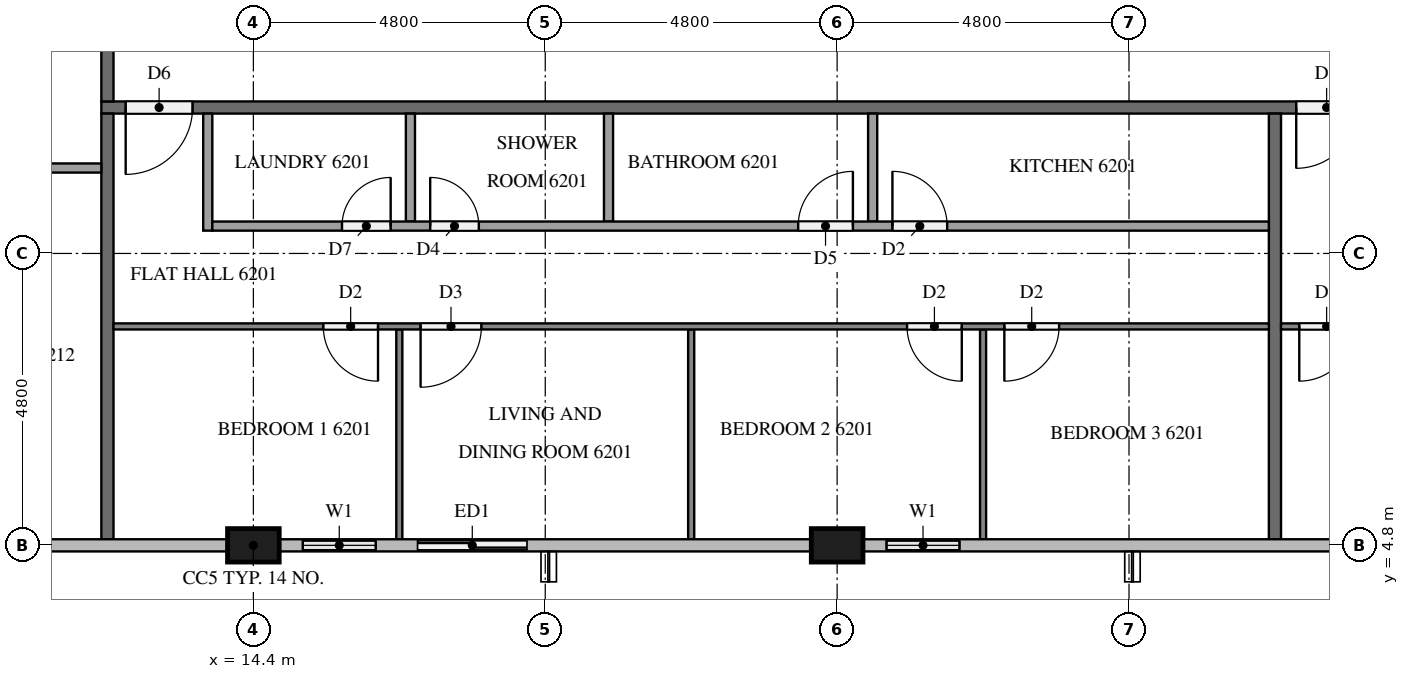
"""IFC4 building model, lengths in metres.
Left out: names, types, materials, properties, quantities, classifications, styles, units other than length and angle.
Written with IfcOpenShell. Run it as: python <this file> out.ifc"""

import sys

from ifc_helpers import new_model, si_unit, direction, frame, frame_2d, origin, origin_2d, place, context, subcontext, project, spatial, rectangle, extrude, element, fill, save


model = new_model("IFC4")
c1 = context("Model", 3, precision=1e-05, world=origin(), true_north=direction((0.0, 1.0)))
c2 = subcontext(c1, "Body", "Model", "MODEL_VIEW")
j1 = project(units=[si_unit("LENGTHUNIT", "METRE"), si_unit("PLANEANGLEUNIT", "RADIAN")], contexts=[c1])
p1 = place(None, origin())
s1 = spatial("IfcSite", under=j1, at=p1, CompositionType="ELEMENT")
p2 = place(p1, origin())
s2 = spatial("IfcBuilding", under=s1, at=p2, CompositionType="ELEMENT")
p3 = place(p2, frame((0.0, 0.0, 238.7)))
s3 = spatial("IfcBuildingStorey", under=s2, at=p3, CompositionType="ELEMENT", Elevation=238.7)
for number, where, z_axis, x_axis in (
    (1, (14.4, 4.8, 0.0), (0.0, 0.0, 1.0), (1.0, 0.0, 0.0)),
    (2, (24.0, 4.8, 0.0), (0.0, 0.0, 1.0), (1.0, 0.0, 0.0)),
):
    element("IfcColumn", number, at=place(p3, frame(where, z_axis=z_axis, x_axis=x_axis)), inside=s3, PredefinedType="COLUMN", context=c2, shape_type="SweptSolid", body=[
        extrude(rectangle(XDim=0.85, YDim=0.55, at=origin_2d()), origin(), (0.0, 0.0, 1.0), 3.2),
    ])
p4 = place(p3, frame((14.825, 4.8, 0.0), z_axis=(0.0, 0.0, 1.0), x_axis=(1.0, 0.0, 0.0)))
e3 = element("IfcWall", 3, at=p4, inside=s3, PredefinedType="SOLIDWALL", context=c2, shape_type="SweptSolid", body=[
    extrude(rectangle(XDim=4.375, YDim=0.15, at=frame_2d((2.188, 0.0))), origin(), (0.0, 0.0, 1.0), 3.2),
])
p5 = place(p4, frame((0.387, 0.0, 0.9)))
e4 = element("IfcOpeningElement", 4, at=p5, cuts=e3, PredefinedType="OPENING", context=c2, shape_type="SweptSolid", body=[
    extrude(rectangle(XDim=1.2, YDim=1.4, at=frame_2d((0.6, 0.7))), frame((0.0, 0.085, 0.0), z_axis=(0.0, -1.0, 0.0), x_axis=(1.0, 0.0, 0.0)), (0.0, 0.0, 1.0), 0.17),
])
p6 = place(p4, frame((2.275, 0.0, 0.0)))
e5 = element("IfcOpeningElement", 5, at=p6, cuts=e3, PredefinedType="OPENING", context=c2, shape_type="SweptSolid", body=[
    extrude(rectangle(XDim=1.8, YDim=2.4, at=frame_2d((0.9, 1.2))), frame((0.0, 0.085, 0.0), z_axis=(0.0, -1.0, 0.0), x_axis=(1.0, 0.0, 0.0)), (0.0, 0.0, 1.0), 0.17),
])
p7 = place(p3, frame((24.425, 4.8, 0.0), z_axis=(0.0, 0.0, 1.0), x_axis=(1.0, 0.0, 0.0)))
e6 = element("IfcWall", 6, at=p7, inside=s3, PredefinedType="SOLIDWALL", context=c2, shape_type="SweptSolid", body=[
    extrude(rectangle(XDim=1.975, YDim=0.15, at=frame_2d((0.987, 0.0))), origin(), (0.0, 0.0, 1.0), 3.2),
])
p8 = place(p7, frame((0.387, 0.0, 0.9)))
e7 = element("IfcOpeningElement", 7, at=p8, cuts=e6, PredefinedType="OPENING", context=c2, shape_type="SweptSolid", body=[
    extrude(rectangle(XDim=1.2, YDim=1.4, at=frame_2d((0.6, 0.7))), frame((0.0, 0.085, 0.0), z_axis=(0.0, -1.0, 0.0), x_axis=(1.0, 0.0, 0.0)), (0.0, 0.0, 1.0), 0.17),
])
p9 = place(p3, frame((50.5, 12.0, 0.0), z_axis=(0.0, 0.0, 1.0), x_axis=(-1.0, 0.0, 0.0)))
e8 = element("IfcWall", 8, at=p9, inside=s3, PredefinedType="PARTITIONING", context=c2, shape_type="SweptSolid", body=[
    extrude(rectangle(XDim=38.6, YDim=0.2, at=frame_2d((19.3, 0.0))), origin(), (0.0, 0.0, 1.0), 3.2),
])
p10 = place(p9, frame((37.1, 0.0, 0.0)))
e9 = element("IfcOpeningElement", 9, at=p10, cuts=e8, PredefinedType="OPENING", context=c2, shape_type="SweptSolid", body=[
    extrude(rectangle(XDim=1.1, YDim=2.1, at=frame_2d((0.55, 1.05))), frame((0.0, 0.11, 0.0), z_axis=(0.0, -1.0, 0.0), x_axis=(1.0, 0.0, 0.0)), (0.0, 0.0, 1.0), 0.22),
])
p11 = place(p9, frame((17.95, 0.0, 0.0)))
e10 = element("IfcOpeningElement", 10, at=p11, cuts=e8, PredefinedType="OPENING", context=c2, shape_type="SweptSolid", body=[
    extrude(rectangle(XDim=1.0, YDim=2.1, at=frame_2d((0.5, 1.05))), frame((0.0, 0.11, 0.0), z_axis=(0.0, -1.0, 0.0), x_axis=(1.0, 0.0, 0.0)), (0.0, 0.0, 1.0), 0.22),
])
p12 = place(p9, frame((8.35, 0.0, 0.0)))
e11 = element("IfcOpeningElement", 11, at=p12, cuts=e8, PredefinedType="OPENING", context=c2, shape_type="SweptSolid", body=[
    extrude(rectangle(XDim=1.0, YDim=2.1, at=frame_2d((0.5, 1.05))), frame((0.0, 0.11, 0.0), z_axis=(0.0, -1.0, 0.0), x_axis=(1.0, 0.0, 0.0)), (0.0, 0.0, 1.0), 0.22),
])
p13 = place(p3, frame((12.0, 12.1, 0.0), z_axis=(0.0, 0.0, 1.0), x_axis=(0.0, 1.0, 0.0)))
e12 = element("IfcWall", 12, at=p13, inside=s3, PredefinedType="PARTITIONING", context=c2, shape_type="SweptSolid", body=[
    extrude(rectangle(XDim=28.6, YDim=0.2, at=frame_2d((14.3, 0.0))), origin(), (0.0, 0.0, 1.0), 3.2),
])
p14 = place(p13, frame((27.35, 0.0, 0.0)))
e13 = element("IfcOpeningElement", 13, at=p14, cuts=e12, PredefinedType="OPENING", context=c2, shape_type="SweptSolid", body=[
    extrude(rectangle(XDim=1.0, YDim=2.1, at=frame_2d((0.5, 1.05))), frame((0.0, 0.11, 0.0), z_axis=(0.0, -1.0, 0.0), x_axis=(1.0, 0.0, 0.0)), (0.0, 0.0, 1.0), 0.22),
])
p15 = place(p13, frame((17.75, 0.0, 0.0)))
e14 = element("IfcOpeningElement", 14, at=p15, cuts=e12, PredefinedType="OPENING", context=c2, shape_type="SweptSolid", body=[
    extrude(rectangle(XDim=1.0, YDim=2.1, at=frame_2d((0.5, 1.05))), frame((0.0, 0.11, 0.0), z_axis=(0.0, -1.0, 0.0), x_axis=(1.0, 0.0, 0.0)), (0.0, 0.0, 1.0), 0.22),
])
p16 = place(p13, frame((3.35, 0.0, 0.0)))
e15 = element("IfcOpeningElement", 15, at=p16, cuts=e12, PredefinedType="OPENING", context=c2, shape_type="SweptSolid", body=[
    extrude(rectangle(XDim=1.0, YDim=2.1, at=frame_2d((0.5, 1.05))), frame((0.0, 0.11, 0.0), z_axis=(0.0, -1.0, 0.0), x_axis=(1.0, 0.0, 0.0)), (0.0, 0.0, 1.0), 0.22),
])
for number, where, z_axis, x_axis in (
    (16, (31.2, 11.9, 0.0), (0.0, 0.0, 1.0), (0.0, -1.0, 0.0)),
    (17, (12.0, 4.9, 0.0), (0.0, 0.0, 1.0), (0.0, 1.0, 0.0)),
):
    element("IfcWall", number, at=place(p3, frame(where, z_axis=z_axis, x_axis=x_axis)), inside=s3, PredefinedType="PARTITIONING", context=c2, shape_type="SweptSolid", body=[
        extrude(rectangle(XDim=7.0, YDim=0.2, at=frame_2d((3.5, 0.0))), origin(), (0.0, 0.0, 1.0), 3.2),
    ])
for number, where, z_axis, x_axis in (
    (18, (16.8, 8.35, 0.0), (0.0, 0.0, 1.0), (0.0, -1.0, 0.0)),
    (19, (21.6, 8.35, 0.0), (0.0, 0.0, 1.0), (0.0, -1.0, 0.0)),
    (20, (26.4, 8.35, 0.0), (0.0, 0.0, 1.0), (0.0, -1.0, 0.0)),
):
    element("IfcWall", number, at=place(p3, frame(where, z_axis=z_axis, x_axis=x_axis)), inside=s3, PredefinedType="PARTITIONING", context=c2, shape_type="SweptSolid", body=[
        extrude(rectangle(XDim=3.45, YDim=0.1, at=frame_2d((1.725, 0.0))), origin(), (0.0, 0.0, 1.0), 3.2),
    ])
p17 = place(p3, frame((31.1, 8.4, 0.0), z_axis=(0.0, 0.0, 1.0), x_axis=(-1.0, 0.0, 0.0)))
e21 = element("IfcWall", 21, at=p17, inside=s3, PredefinedType="PARTITIONING", context=c2, shape_type="SweptSolid", body=[
    extrude(rectangle(XDim=19.0, YDim=0.1, at=frame_2d((9.5, 0.0))), origin(), (0.0, 0.0, 1.0), 3.2),
])
p18 = place(p17, frame((14.65, 0.0, 0.0)))
e22 = element("IfcOpeningElement", 22, at=p18, cuts=e21, PredefinedType="OPENING", context=c2, shape_type="SweptSolid", body=[
    extrude(rectangle(XDim=0.9, YDim=2.1, at=frame_2d((0.45, 1.05))), frame((0.0, 0.06, 0.0), z_axis=(0.0, -1.0, 0.0), x_axis=(1.0, 0.0, 0.0)), (0.0, 0.0, 1.0), 0.12),
])
p19 = place(p17, frame((12.95, 0.0, 0.0)))
e23 = element("IfcOpeningElement", 23, at=p19, cuts=e21, PredefinedType="OPENING", context=c2, shape_type="SweptSolid", body=[
    extrude(rectangle(XDim=1.0, YDim=2.1, at=frame_2d((0.5, 1.05))), frame((0.0, 0.06, 0.0), z_axis=(0.0, -1.0, 0.0), x_axis=(1.0, 0.0, 0.0)), (0.0, 0.0, 1.0), 0.12),
])
p20 = place(p17, frame((5.05, 0.0, 0.0)))
e24 = element("IfcOpeningElement", 24, at=p20, cuts=e21, PredefinedType="OPENING", context=c2, shape_type="SweptSolid", body=[
    extrude(rectangle(XDim=0.9, YDim=2.1, at=frame_2d((0.45, 1.05))), frame((0.0, 0.06, 0.0), z_axis=(0.0, -1.0, 0.0), x_axis=(1.0, 0.0, 0.0)), (0.0, 0.0, 1.0), 0.12),
])
p21 = place(p17, frame((3.45, 0.0, 0.0)))
e25 = element("IfcOpeningElement", 25, at=p21, cuts=e21, PredefinedType="OPENING", context=c2, shape_type="SweptSolid", body=[
    extrude(rectangle(XDim=0.9, YDim=2.1, at=frame_2d((0.45, 1.05))), frame((0.0, 0.06, 0.0), z_axis=(0.0, -1.0, 0.0), x_axis=(1.0, 0.0, 0.0)), (0.0, 0.0, 1.0), 0.12),
])
for number, where, z_axis, x_axis in (
    (26, (16.983, 11.9, 0.0), (0.0, 0.0, 1.0), (0.0, -1.0, 0.0)),
    (27, (20.24, 11.9, 0.0), (0.0, 0.0, 1.0), (0.0, -1.0, 0.0)),
    (28, (24.584, 11.9, 0.0), (0.0, 0.0, 1.0), (0.0, -1.0, 0.0)),
):
    element("IfcWall", number, at=place(p3, frame(where, z_axis=z_axis, x_axis=x_axis)), inside=s3, PredefinedType="PARTITIONING", context=c2, shape_type="SweptSolid", body=[
        extrude(rectangle(XDim=1.775, YDim=0.15, at=frame_2d((0.887, 0.0))), origin(), (0.0, 0.0, 1.0), 3.2),
    ])
p22 = place(p3, frame((13.65, 11.9, 0.0), z_axis=(0.0, 0.0, 1.0), x_axis=(0.0, -1.0, 0.0)))
e29 = element("IfcWall", 29, at=p22, inside=s3, PredefinedType="PARTITIONING", context=c2, shape_type="SweptSolid", body=[
    extrude(rectangle(XDim=1.925, YDim=0.15, at=frame_2d((0.962, 0.0))), origin(), (0.0, 0.0, 1.0), 3.2),
])
p23 = place(p3, frame((13.725, 10.05, 0.0), z_axis=(0.0, 0.0, 1.0), x_axis=(1.0, 0.0, 0.0)))
e30 = element("IfcWall", 30, at=p23, inside=s3, PredefinedType="PARTITIONING", context=c2, shape_type="SweptSolid", body=[
    extrude(rectangle(XDim=17.375, YDim=0.15, at=frame_2d((8.688, 0.0))), origin(), (0.0, 0.0, 1.0), 3.2),
])
p24 = place(p23, frame((2.133, 0.0, 0.0)))
e31 = element("IfcOpeningElement", 31, at=p24, cuts=e30, PredefinedType="OPENING", context=c2, shape_type="SweptSolid", body=[
    extrude(rectangle(XDim=0.8, YDim=2.1, at=frame_2d((0.4, 1.05))), frame((0.0, 0.085, 0.0), z_axis=(0.0, -1.0, 0.0), x_axis=(1.0, 0.0, 0.0)), (0.0, 0.0, 1.0), 0.17),
])
p25 = place(p23, frame((3.583, 0.0, 0.0)))
e32 = element("IfcOpeningElement", 32, at=p25, cuts=e30, PredefinedType="OPENING", context=c2, shape_type="SweptSolid", body=[
    extrude(rectangle(XDim=0.8, YDim=2.1, at=frame_2d((0.4, 1.05))), frame((0.0, 0.085, 0.0), z_axis=(0.0, -1.0, 0.0), x_axis=(1.0, 0.0, 0.0)), (0.0, 0.0, 1.0), 0.17),
])
p26 = place(p23, frame((9.635, 0.0, 0.0)))
e33 = element("IfcOpeningElement", 33, at=p26, cuts=e30, PredefinedType="OPENING", context=c2, shape_type="SweptSolid", body=[
    extrude(rectangle(XDim=0.9, YDim=2.1, at=frame_2d((0.45, 1.05))), frame((0.0, 0.085, 0.0), z_axis=(0.0, -1.0, 0.0), x_axis=(1.0, 0.0, 0.0)), (0.0, 0.0, 1.0), 0.17),
])
p27 = place(p23, frame((11.184, 0.0, 0.0)))
e34 = element("IfcOpeningElement", 34, at=p27, cuts=e30, PredefinedType="OPENING", context=c2, shape_type="SweptSolid", body=[
    extrude(rectangle(XDim=0.9, YDim=2.1, at=frame_2d((0.45, 1.05))), frame((0.0, 0.085, 0.0), z_axis=(0.0, -1.0, 0.0), x_axis=(1.0, 0.0, 0.0)), (0.0, 0.0, 1.0), 0.17),
])
p28 = place(p3, frame((40.7, 8.4, 0.0), z_axis=(0.0, 0.0, 1.0), x_axis=(-1.0, 0.0, 0.0)))
e35 = element("IfcWall", 35, at=p28, inside=s3, PredefinedType="PARTITIONING", context=c2, shape_type="SweptSolid", body=[
    extrude(rectangle(XDim=9.4, YDim=0.1, at=frame_2d((4.7, 0.0))), origin(), (0.0, 0.0, 1.0), 3.2),
])
p29 = place(p28, frame((8.2, 0.0, 0.0)))
e36 = element("IfcOpeningElement", 36, at=p29, cuts=e35, PredefinedType="OPENING", context=c2, shape_type="SweptSolid", body=[
    extrude(rectangle(XDim=0.9, YDim=2.1, at=frame_2d((0.45, 1.05))), frame((0.0, 0.06, 0.0), z_axis=(0.0, -1.0, 0.0), x_axis=(1.0, 0.0, 0.0)), (0.0, 0.0, 1.0), 0.12),
])
p30 = place(p28, frame((0.3, 0.0, 0.0)))
e37 = element("IfcOpeningElement", 37, at=p30, cuts=e35, PredefinedType="OPENING", context=c2, shape_type="SweptSolid", body=[
    extrude(rectangle(XDim=1.0, YDim=2.1, at=frame_2d((0.5, 1.05))), frame((0.0, 0.06, 0.0), z_axis=(0.0, -1.0, 0.0), x_axis=(1.0, 0.0, 0.0)), (0.0, 0.0, 1.0), 0.12),
])
p31 = place(p3, frame((11.9, 11.005, 0.0), z_axis=(0.0, 0.0, 1.0), x_axis=(-1.0, 0.0, 0.0)))
e38 = element("IfcWall", 38, at=p31, inside=s3, PredefinedType="PARTITIONING", context=c2, shape_type="SweptSolid", body=[
    extrude(rectangle(XDim=2.975, YDim=0.15, at=frame_2d((1.487, 0.0))), origin(), (0.0, 0.0, 1.0), 3.2),
])
p32 = place(p5, origin())
e39 = element("IfcWindow", 39, at=p32, inside=s3, PartitioningType="SINGLE_PANEL", PredefinedType="WINDOW", context=c2, shape_type="SweptSolid", body=[
    extrude(rectangle(XDim=1.2, YDim=1.4, at=frame_2d((0.6, 0.7))), frame((0.0, 0.03, 0.0), z_axis=(0.0, -1.0, 0.0), x_axis=(1.0, 0.0, 0.0)), (0.0, 0.0, 1.0), 0.06),
])
fill(e4, e39)
p33 = place(p6, origin())
e40 = element("IfcDoor", 40, at=p33, inside=s3, OperationType="SLIDING_TO_LEFT", PredefinedType="DOOR", context=c2, shape_type="SweptSolid", body=[
    extrude(rectangle(XDim=1.8, YDim=2.4, at=frame_2d((0.9, 1.2))), frame((0.0, 0.025, 0.0), z_axis=(0.0, -1.0, 0.0), x_axis=(1.0, 0.0, 0.0)), (0.0, 0.0, 1.0), 0.05),
])
fill(e5, e40)
p34 = place(p8, origin())
e41 = element("IfcWindow", 41, at=p34, inside=s3, PartitioningType="SINGLE_PANEL", PredefinedType="WINDOW", context=c2, shape_type="SweptSolid", body=[
    extrude(rectangle(XDim=1.2, YDim=1.4, at=frame_2d((0.6, 0.7))), frame((0.0, 0.03, 0.0), z_axis=(0.0, -1.0, 0.0), x_axis=(1.0, 0.0, 0.0)), (0.0, 0.0, 1.0), 0.06),
])
fill(e7, e41)
p35 = place(p10, origin())
e42 = element("IfcDoor", 42, at=p35, inside=s3, OperationType="SINGLE_SWING_RIGHT", PredefinedType="DOOR", context=c2, shape_type="SweptSolid", body=[
    extrude(rectangle(XDim=1.1, YDim=2.1, at=frame_2d((0.55, 1.05))), frame((0.0, 0.025, 0.0), z_axis=(0.0, -1.0, 0.0), x_axis=(1.0, 0.0, 0.0)), (0.0, 0.0, 1.0), 0.05),
])
fill(e9, e42)
p36 = place(p11, origin())
e43 = element("IfcDoor", 43, at=p36, inside=s3, OperationType="SINGLE_SWING_RIGHT", PredefinedType="DOOR", context=c2, shape_type="SweptSolid", body=[
    extrude(rectangle(XDim=1.0, YDim=2.1, at=frame_2d((0.5, 1.05))), frame((0.0, 0.025, 0.0), z_axis=(0.0, -1.0, 0.0), x_axis=(1.0, 0.0, 0.0)), (0.0, 0.0, 1.0), 0.05),
])
fill(e10, e43)
p37 = place(p18, origin())
e44 = element("IfcDoor", 44, at=p37, inside=s3, OperationType="SINGLE_SWING_LEFT", PredefinedType="DOOR", context=c2, shape_type="SweptSolid", body=[
    extrude(rectangle(XDim=0.9, YDim=2.1, at=frame_2d((0.45, 1.05))), frame((0.0, 0.025, 0.0), z_axis=(0.0, -1.0, 0.0), x_axis=(1.0, 0.0, 0.0)), (0.0, 0.0, 1.0), 0.05),
])
fill(e22, e44)
p38 = place(p19, origin())
e45 = element("IfcDoor", 45, at=p38, inside=s3, OperationType="SINGLE_SWING_RIGHT", PredefinedType="DOOR", context=c2, shape_type="SweptSolid", body=[
    extrude(rectangle(XDim=1.0, YDim=2.1, at=frame_2d((0.5, 1.05))), frame((0.0, 0.025, 0.0), z_axis=(0.0, -1.0, 0.0), x_axis=(1.0, 0.0, 0.0)), (0.0, 0.0, 1.0), 0.05),
])
fill(e23, e45)
p39 = place(p20, origin())
e46 = element("IfcDoor", 46, at=p39, inside=s3, OperationType="SINGLE_SWING_LEFT", PredefinedType="DOOR", context=c2, shape_type="SweptSolid", body=[
    extrude(rectangle(XDim=0.9, YDim=2.1, at=frame_2d((0.45, 1.05))), frame((0.0, 0.025, 0.0), z_axis=(0.0, -1.0, 0.0), x_axis=(1.0, 0.0, 0.0)), (0.0, 0.0, 1.0), 0.05),
])
fill(e24, e46)
p40 = place(p21, origin())
e47 = element("IfcDoor", 47, at=p40, inside=s3, OperationType="SINGLE_SWING_RIGHT", PredefinedType="DOOR", context=c2, shape_type="SweptSolid", body=[
    extrude(rectangle(XDim=0.9, YDim=2.1, at=frame_2d((0.45, 1.05))), frame((0.0, 0.025, 0.0), z_axis=(0.0, -1.0, 0.0), x_axis=(1.0, 0.0, 0.0)), (0.0, 0.0, 1.0), 0.05),
])
fill(e25, e47)
p41 = place(p24, origin())
e48 = element("IfcDoor", 48, at=p41, inside=s3, OperationType="SINGLE_SWING_RIGHT", PredefinedType="DOOR", context=c2, shape_type="SweptSolid", body=[
    extrude(rectangle(XDim=0.8, YDim=2.1, at=frame_2d((0.4, 1.05))), frame((0.0, 0.025, 0.0), z_axis=(0.0, -1.0, 0.0), x_axis=(1.0, 0.0, 0.0)), (0.0, 0.0, 1.0), 0.05),
])
fill(e31, e48)
p42 = place(p25, origin())
e49 = element("IfcDoor", 49, at=p42, inside=s3, OperationType="SINGLE_SWING_LEFT", PredefinedType="DOOR", context=c2, shape_type="SweptSolid", body=[
    extrude(rectangle(XDim=0.8, YDim=2.1, at=frame_2d((0.4, 1.05))), frame((0.0, 0.025, 0.0), z_axis=(0.0, -1.0, 0.0), x_axis=(1.0, 0.0, 0.0)), (0.0, 0.0, 1.0), 0.05),
])
fill(e32, e49)
p43 = place(p26, origin())
e50 = element("IfcDoor", 50, at=p43, inside=s3, OperationType="SINGLE_SWING_RIGHT", PredefinedType="DOOR", context=c2, shape_type="SweptSolid", body=[
    extrude(rectangle(XDim=0.9, YDim=2.1, at=frame_2d((0.45, 1.05))), frame((0.0, 0.025, 0.0), z_axis=(0.0, -1.0, 0.0), x_axis=(1.0, 0.0, 0.0)), (0.0, 0.0, 1.0), 0.05),
])
fill(e33, e50)
p44 = place(p27, origin())
e51 = element("IfcDoor", 51, at=p44, inside=s3, OperationType="SINGLE_SWING_LEFT", PredefinedType="DOOR", context=c2, shape_type="SweptSolid", body=[
    extrude(rectangle(XDim=0.9, YDim=2.1, at=frame_2d((0.45, 1.05))), frame((0.0, 0.025, 0.0), z_axis=(0.0, -1.0, 0.0), x_axis=(1.0, 0.0, 0.0)), (0.0, 0.0, 1.0), 0.05),
])
fill(e34, e51)
p45 = place(p29, origin())
e52 = element("IfcDoor", 52, at=p45, inside=s3, OperationType="SINGLE_SWING_RIGHT", PredefinedType="DOOR", context=c2, shape_type="SweptSolid", body=[
    extrude(rectangle(XDim=0.9, YDim=2.1, at=frame_2d((0.45, 1.05))), frame((0.0, 0.025, 0.0), z_axis=(0.0, -1.0, 0.0), x_axis=(1.0, 0.0, 0.0)), (0.0, 0.0, 1.0), 0.05),
])
fill(e36, e52)
save(model, sys.argv[1])
